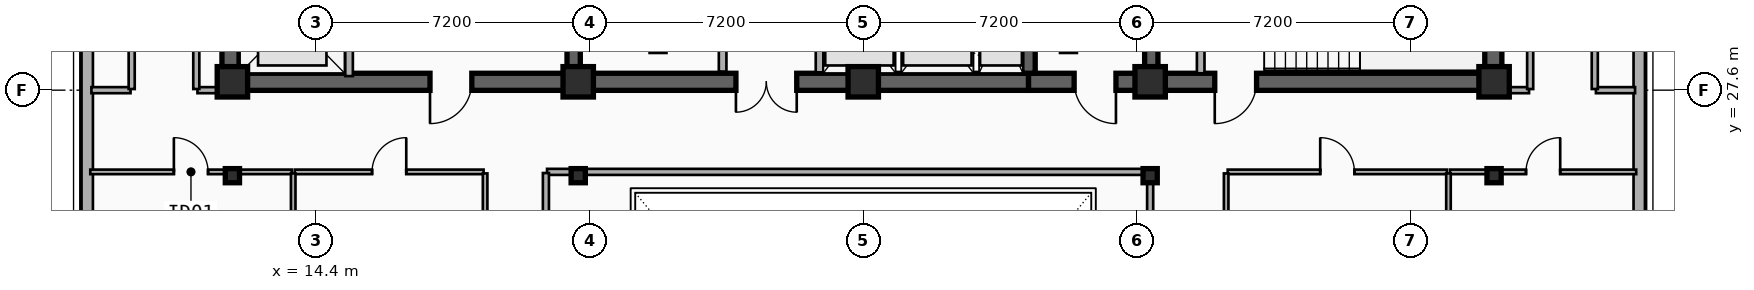
"""IFC4 building model, lengths in metres.
Left out: names, types, materials, properties, quantities, classifications, styles, units other than length and angle.
Written with IfcOpenShell. Run it as: python <this file> out.ifc"""

import sys

from ifc_helpers import new_model, si_unit, direction, frame, frame_2d, origin, origin_2d, place, context, subcontext, project, spatial, rectangle, i_section, extrude, element, fill, save


model = new_model("IFC4")
c1 = context("Model", 3, precision=1e-05, world=origin(), true_north=direction((0.0, 1.0)))
c2 = subcontext(c1, "Body", "Model", "MODEL_VIEW")
j1 = project(units=[si_unit("LENGTHUNIT", "METRE"), si_unit("PLANEANGLEUNIT", "RADIAN")], contexts=[c1])
p1 = place(None, origin())
s1 = spatial("IfcSite", under=j1, at=p1, CompositionType="ELEMENT")
p2 = place(p1, origin())
s2 = spatial("IfcBuilding", under=s1, at=p2, CompositionType="ELEMENT")
p3 = place(p2, frame((0.0, 0.0, 265.8)))
s3 = spatial("IfcBuildingStorey", under=s2, at=p3, CompositionType="ELEMENT", Elevation=265.8)
p4 = place(p3, frame((21.18, 27.82, 0.0), z_axis=(0.0, 0.0, 1.0), x_axis=(-1.0, 0.0, 0.0)))
e1 = element("IfcWall", 1, at=p4, inside=s3, PredefinedType="SHEAR", context=c2, shape_type="SweptSolid", body=[
    extrude(rectangle(XDim=9.03, YDim=0.45, at=frame_2d((4.515, 0.0))), origin(), (0.0, 0.0, 1.0), 3.7),
])
p5 = place(p4, frame((2.68, 0.0, 0.0)))
e2 = element("IfcOpeningElement", 2, at=p5, cuts=e1, PredefinedType="OPENING", context=c2, shape_type="SweptSolid", body=[
    extrude(rectangle(XDim=1.1, YDim=2.15, at=frame_2d((0.55, 1.075))), frame((0.0, 0.235, 0.0), z_axis=(0.0, -1.0, 0.0), x_axis=(1.0, 0.0, 0.0)), (0.0, 0.0, 1.0), 0.47),
])
p6 = place(p3, frame((33.15, 27.82, 0.0), z_axis=(0.0, 0.0, 1.0), x_axis=(-1.0, 0.0, 0.0)))
e3 = element("IfcWall", 3, at=p6, inside=s3, PredefinedType="SHEAR", context=c2, shape_type="SweptSolid", body=[
    extrude(rectangle(XDim=11.97, YDim=0.45, at=frame_2d((5.985, 0.0))), origin(), (0.0, 0.0, 1.0), 3.7),
])
p7 = place(p6, frame((6.1, 0.0, 0.0)))
e4 = element("IfcOpeningElement", 4, at=p7, cuts=e3, PredefinedType="OPENING", context=c2, shape_type="SweptSolid", body=[
    extrude(rectangle(XDim=1.6, YDim=2.2, at=frame_2d((0.8, 1.1))), frame((0.0, 0.235, 0.0), z_axis=(0.0, -1.0, 0.0), x_axis=(1.0, 0.0, 0.0)), (0.0, 0.0, 1.0), 0.47),
])
p8 = place(p3, frame((45.38, 27.82, 0.0), z_axis=(0.0, 0.0, 1.0), x_axis=(-1.0, 0.0, 0.0)))
e5 = element("IfcWall", 5, at=p8, inside=s3, PredefinedType="SHEAR", context=c2, shape_type="SweptSolid", body=[
    extrude(rectangle(XDim=12.23, YDim=0.45, at=frame_2d((6.115, 0.0))), origin(), (0.0, 0.0, 1.0), 3.7),
])
p9 = place(p8, frame((9.93, 0.0, 0.0)))
e6 = element("IfcOpeningElement", 6, at=p9, cuts=e5, PredefinedType="OPENING", context=c2, shape_type="SweptSolid", body=[
    extrude(rectangle(XDim=1.1, YDim=2.15, at=frame_2d((0.55, 1.075))), frame((0.0, 0.235, 0.0), z_axis=(0.0, -1.0, 0.0), x_axis=(1.0, 0.0, 0.0)), (0.0, 0.0, 1.0), 0.47),
])
p10 = place(p8, frame((6.23, 0.0, 0.0)))
e7 = element("IfcOpeningElement", 7, at=p10, cuts=e5, PredefinedType="OPENING", context=c2, shape_type="SweptSolid", body=[
    extrude(rectangle(XDim=1.1, YDim=2.15, at=frame_2d((0.55, 1.075))), frame((0.0, 0.235, 0.0), z_axis=(0.0, -1.0, 0.0), x_axis=(1.0, 0.0, 0.0)), (0.0, 0.0, 1.0), 0.47),
])
for number, where, z_axis, x_axis in (
    (8, (12.15, 28.045, 0.0), (0.0, 0.0, 1.0), (0.0, 1.0, 0.0)),
    (9, (45.38, 28.045, 0.0), (0.0, 0.0, 1.0), (0.0, 1.0, 0.0)),
):
    element("IfcWall", number, at=place(p3, frame(where, z_axis=z_axis, x_axis=x_axis)), inside=s3, PredefinedType="SHEAR", context=c2, shape_type="SweptSolid", body=[
        extrude(rectangle(XDim=8.78, YDim=0.45, at=frame_2d((4.39, 0.0))), origin(), (0.0, 0.0, 1.0), 3.7),
    ])
for number, where, z_axis, x_axis in (
    (10, (21.18, 28.045, 0.0), (0.0, 0.0, 1.0), (0.0, 1.0, 0.0)),
    (11, (33.15, 28.045, 0.0), (0.0, 0.0, 1.0), (0.0, 1.0, 0.0)),
):
    element("IfcWall", number, at=place(p3, frame(where, z_axis=z_axis, x_axis=x_axis)), inside=s3, PredefinedType="SHEAR", context=c2, shape_type="SweptSolid", body=[
        extrude(rectangle(XDim=8.78, YDim=0.35, at=frame_2d((4.39, 0.0))), origin(), (0.0, 0.0, 1.0), 3.7),
    ])
p11 = place(p3, frame((36.38, 28.045, 0.0), z_axis=(0.0, 0.0, 1.0), x_axis=(0.0, 1.0, 0.0)))
e12 = element("IfcWall", 12, at=p11, inside=s3, PredefinedType="SHEAR", context=c2, shape_type="SweptSolid", body=[
    extrude(rectangle(XDim=8.78, YDim=0.35, at=frame_2d((4.39, 0.0))), origin(), (0.0, 0.0, 1.0), 3.7),
])
p12 = place(p11, frame((3.735, 0.0, 0.0)))
e13 = element("IfcOpeningElement", 13, at=p12, cuts=e12, PredefinedType="OPENING", context=c2, shape_type="SweptSolid", body=[
    extrude(rectangle(XDim=1.1, YDim=2.15, at=frame_2d((0.55, 1.075))), frame((0.0, 0.185, 0.0), z_axis=(0.0, -1.0, 0.0), x_axis=(1.0, 0.0, 0.0)), (0.0, 0.0, 1.0), 0.37),
])
for number, where, z_axis, x_axis in (
    (14, (12.2, 27.82, 0.0), (0.0, 0.0, 1.0), (1.0, 0.0, 0.0)),
    (15, (21.3, 27.82, 0.0), (0.0, 0.0, 1.0), (1.0, 0.0, 0.0)),
    (16, (28.8, 27.82, 0.0), (0.0, 0.0, 1.0), (1.0, 0.0, 0.0)),
    (17, (36.35, 27.82, 0.0), (0.0, 0.0, 1.0), (1.0, 0.0, 0.0)),
    (18, (45.4, 27.82, 0.0), (0.0, 0.0, 1.0), (1.0, 0.0, 0.0)),
):
    element("IfcColumn", number, at=place(p3, frame(where, z_axis=z_axis, x_axis=x_axis)), inside=s3, PredefinedType="COLUMN", context=c2, shape_type="SweptSolid", body=[
        extrude(rectangle(XDim=0.8, YDim=0.8, at=origin_2d()), origin(), (0.0, 0.0, 1.0), 3.7),
    ])
for number, where, z_axis, x_axis in (
    (19, (12.2, 25.35, 0.0), (0.0, 0.0, 1.0), (1.0, 0.0, 0.0)),
    (20, (21.3, 25.35, 0.0), (0.0, 0.0, 1.0), (1.0, 0.0, 0.0)),
    (21, (36.35, 25.35, 0.0), (0.0, 0.0, 1.0), (1.0, 0.0, 0.0)),
    (22, (45.4, 25.35, 0.0), (0.0, 0.0, 1.0), (1.0, 0.0, 0.0)),
):
    element("IfcColumn", number, at=place(p3, frame(where, z_axis=z_axis, x_axis=x_axis)), inside=s3, PredefinedType="COLUMN", context=c2, shape_type="SweptSolid", body=[
        extrude(i_section(OverallWidth=0.374, OverallDepth=0.372, WebThickness=0.017, FlangeThickness=0.027, FilletRadius=0.015, at=origin_2d()), origin(), (0.0, 0.0, 1.0), 3.7),
    ])
p13 = place(p3, frame((49.22, 36.8, 0.0), z_axis=(0.0, 0.0, 1.0), x_axis=(0.0, -1.0, 0.0)))
e23 = element("IfcWall", 23, at=p13, inside=s3, PredefinedType="SOLIDWALL", context=c2, shape_type="SweptSolid", body=[
    extrude(rectangle(XDim=34.2, YDim=0.3, at=frame_2d((17.1, 0.0))), origin(), (0.0, 0.0, 1.0), 3.42),
])
p14 = place(p13, frame((17.66, 0.0, 0.75)))
e24 = element("IfcOpeningElement", 24, at=p14, cuts=e23, PredefinedType="OPENING", context=c2, shape_type="SweptSolid", body=[
    extrude(rectangle(XDim=2.1, YDim=2.1, at=frame_2d((1.05, 1.05))), frame((0.0, 0.16, 0.0), z_axis=(0.0, -1.0, 0.0), x_axis=(1.0, 0.0, 0.0)), (0.0, 0.0, 1.0), 0.32),
])
p15 = place(p13, frame((25.77, 0.0, 0.75)))
e25 = element("IfcOpeningElement", 25, at=p15, cuts=e23, PredefinedType="OPENING", context=c2, shape_type="SweptSolid", body=[
    extrude(rectangle(XDim=2.1, YDim=2.1, at=frame_2d((1.05, 1.05))), frame((0.0, 0.16, 0.0), z_axis=(0.0, -1.0, 0.0), x_axis=(1.0, 0.0, 0.0)), (0.0, 0.0, 1.0), 0.32),
])
p16 = place(p3, frame((8.38, 2.6, 0.0), z_axis=(0.0, 0.0, 1.0), x_axis=(0.0, 1.0, 0.0)))
e26 = element("IfcWall", 26, at=p16, inside=s3, PredefinedType="SOLIDWALL", context=c2, shape_type="SweptSolid", body=[
    extrude(rectangle(XDim=34.2, YDim=0.3, at=frame_2d((17.1, 0.0))), origin(), (0.0, 0.0, 1.0), 3.42),
])
p17 = place(p16, frame((6.33, 0.0, 0.75)))
e27 = element("IfcOpeningElement", 27, at=p17, cuts=e26, PredefinedType="OPENING", context=c2, shape_type="SweptSolid", body=[
    extrude(rectangle(XDim=2.1, YDim=2.1, at=frame_2d((1.05, 1.05))), frame((0.0, 0.16, 0.0), z_axis=(0.0, -1.0, 0.0), x_axis=(1.0, 0.0, 0.0)), (0.0, 0.0, 1.0), 0.32),
])
p18 = place(p16, frame((14.44, 0.0, 0.75)))
e28 = element("IfcOpeningElement", 28, at=p18, cuts=e26, PredefinedType="OPENING", context=c2, shape_type="SweptSolid", body=[
    extrude(rectangle(XDim=2.1, YDim=2.1, at=frame_2d((1.05, 1.05))), frame((0.0, 0.16, 0.0), z_axis=(0.0, -1.0, 0.0), x_axis=(1.0, 0.0, 0.0)), (0.0, 0.0, 1.0), 0.32),
])
p19 = place(p3, frame((15.27, 27.97, 0.0), z_axis=(0.0, 0.0, 1.0), x_axis=(0.0, 1.0, 0.0)))
e29 = element("IfcWall", 29, at=p19, inside=s3, PredefinedType="PARTITIONING", context=c2, shape_type="SweptSolid", body=[
    extrude(rectangle(XDim=2.96, YDim=0.2, at=frame_2d((1.48, 0.0))), origin(), (0.0, 0.0, 1.0), 2.49),
])
p20 = place(p19, frame((0.93, 0.0, 0.0)))
e30 = element("IfcOpeningElement", 30, at=p20, cuts=e29, PredefinedType="OPENING", context=c2, shape_type="SweptSolid", body=[
    extrude(rectangle(XDim=1.1, YDim=2.15, at=frame_2d((0.55, 1.075))), frame((0.0, 0.11, 0.0), z_axis=(0.0, -1.0, 0.0), x_axis=(1.0, 0.0, 0.0)), (0.0, 0.0, 1.0), 0.22),
])
p21 = place(p3, frame((27.65, 28.07, 0.0), z_axis=(0.0, 0.0, 1.0), x_axis=(0.0, 1.0, 0.0)))
e31 = element("IfcWall", 31, at=p21, inside=s3, PredefinedType="PARTITIONING", context=c2, shape_type="SweptSolid", body=[
    extrude(rectangle(XDim=2.58, YDim=0.2, at=frame_2d((1.29, 0.0))), origin(), (0.0, 0.0, 1.0), 2.49),
])
p22 = place(p3, frame((37.68, 28.045, 0.0), z_axis=(0.0, 0.0, 1.0), x_axis=(0.0, 1.0, 0.0)))
e32 = element("IfcWall", 32, at=p22, inside=s3, PredefinedType="PARTITIONING", context=c2, shape_type="SweptSolid", body=[
    extrude(rectangle(XDim=3.205, YDim=0.2, at=frame_2d((1.603, 0.0))), origin(), (0.0, 0.0, 1.0), 2.8),
])
p23 = place(p3, frame((25.1, 28.09, 0.0), z_axis=(0.0, 0.0, 1.0), x_axis=(0.0, 1.0, 0.0)))
e33 = element("IfcWall", 33, at=p23, inside=s3, PredefinedType="PARTITIONING", context=c2, shape_type="SweptSolid", body=[
    extrude(rectangle(XDim=1.82, YDim=0.2, at=frame_2d((0.91, 0.0))), origin(), (0.0, 0.0, 1.0), 2.8),
])
p24 = place(p23, frame((0.68, 0.0, 0.0)))
e34 = element("IfcOpeningElement", 34, at=p24, cuts=e33, PredefinedType="OPENING", context=c2, shape_type="SweptSolid", body=[
    extrude(rectangle(XDim=1.0, YDim=2.15, at=frame_2d((0.5, 1.075))), frame((0.0, 0.11, 0.0), z_axis=(0.0, -1.0, 0.0), x_axis=(1.0, 0.0, 0.0)), (0.0, 0.0, 1.0), 0.22),
])
p25 = place(p3, frame((8.46, 25.45, 0.0), z_axis=(0.0, 0.0, 1.0), x_axis=(1.0, 0.0, 0.0)))
e35 = element("IfcWall", 35, at=p25, inside=s3, PredefinedType="PARTITIONING", context=c2, shape_type="SweptSolid", body=[
    extrude(rectangle(XDim=5.3, YDim=0.12, at=frame_2d((2.65, 0.0))), origin(), (0.0, 0.0, 1.0), 2.7),
])
p26 = place(p25, frame((2.2, 0.0, 0.0)))
e36 = element("IfcOpeningElement", 36, at=p26, cuts=e35, PredefinedType="OPENING", context=c2, shape_type="SweptSolid", body=[
    extrude(rectangle(XDim=0.9, YDim=2.1, at=frame_2d((0.45, 1.05))), frame((0.0, 0.07, 0.0), z_axis=(0.0, -1.0, 0.0), x_axis=(1.0, 0.0, 0.0)), (0.0, 0.0, 1.0), 0.14),
])
p27 = place(p3, frame((13.84, 25.45, 0.0), z_axis=(0.0, 0.0, 1.0), x_axis=(1.0, 0.0, 0.0)))
e37 = element("IfcWall", 37, at=p27, inside=s3, PredefinedType="PARTITIONING", context=c2, shape_type="SweptSolid", body=[
    extrude(rectangle(XDim=4.97, YDim=0.12, at=frame_2d((2.485, 0.0))), origin(), (0.0, 0.0, 1.0), 3.42),
])
p28 = place(p27, frame((2.035, 0.0, 0.0)))
e38 = element("IfcOpeningElement", 38, at=p28, cuts=e37, PredefinedType="OPENING", context=c2, shape_type="SweptSolid", body=[
    extrude(rectangle(XDim=0.9, YDim=2.1, at=frame_2d((0.45, 1.05))), frame((0.0, 0.07, 0.0), z_axis=(0.0, -1.0, 0.0), x_axis=(1.0, 0.0, 0.0)), (0.0, 0.0, 1.0), 0.14),
])
p29 = place(p3, frame((38.39, 25.45, 0.0), z_axis=(0.0, 0.0, 1.0), x_axis=(1.0, 0.0, 0.0)))
e39 = element("IfcWall", 39, at=p29, inside=s3, PredefinedType="PARTITIONING", context=c2, shape_type="SweptSolid", body=[
    extrude(rectangle(XDim=5.77, YDim=0.12, at=frame_2d((2.885, 0.0))), origin(), (0.0, 0.0, 1.0), 3.42),
])
p30 = place(p29, frame((2.435, 0.0, 0.0)))
e40 = element("IfcOpeningElement", 40, at=p30, cuts=e39, PredefinedType="OPENING", context=c2, shape_type="SweptSolid", body=[
    extrude(rectangle(XDim=0.9, YDim=2.1, at=frame_2d((0.45, 1.05))), frame((0.0, 0.07, 0.0), z_axis=(0.0, -1.0, 0.0), x_axis=(1.0, 0.0, 0.0)), (0.0, 0.0, 1.0), 0.14),
])
p31 = place(p3, frame((44.24, 25.45, 0.0), z_axis=(0.0, 0.0, 1.0), x_axis=(1.0, 0.0, 0.0)))
e41 = element("IfcWall", 41, at=p31, inside=s3, PredefinedType="PARTITIONING", context=c2, shape_type="SweptSolid", body=[
    extrude(rectangle(XDim=4.9, YDim=0.12, at=frame_2d((2.45, 0.0))), origin(), (0.0, 0.0, 1.0), 2.7),
])
p32 = place(p31, frame((2.0, 0.0, 0.0)))
e42 = element("IfcOpeningElement", 42, at=p32, cuts=e41, PredefinedType="OPENING", context=c2, shape_type="SweptSolid", body=[
    extrude(rectangle(XDim=0.9, YDim=2.1, at=frame_2d((0.45, 1.05))), frame((0.0, 0.07, 0.0), z_axis=(0.0, -1.0, 0.0), x_axis=(1.0, 0.0, 0.0)), (0.0, 0.0, 1.0), 0.14),
])
p33 = place(p3, frame((18.85, 8.89, 0.0), z_axis=(0.0, 0.0, 1.0), x_axis=(0.0, 1.0, 0.0)))
e43 = element("IfcWall", 43, at=p33, inside=s3, PredefinedType="PARTITIONING", context=c2, shape_type="SweptSolid", body=[
    extrude(rectangle(XDim=16.52, YDim=0.12, at=frame_2d((8.26, 0.0))), origin(), (0.0, 0.0, 1.0), 2.91),
])
p34 = place(p33, frame((7.81, 0.0, 0.0)))
e44 = element("IfcOpeningElement", 44, at=p34, cuts=e43, PredefinedType="OPENING", context=c2, shape_type="SweptSolid", body=[
    extrude(rectangle(XDim=0.9, YDim=2.1, at=frame_2d((0.45, 1.05))), frame((0.0, 0.07, 0.0), z_axis=(0.0, -1.0, 0.0), x_axis=(1.0, 0.0, 0.0)), (0.0, 0.0, 1.0), 0.14),
])
p35 = place(p3, frame((38.35, 8.89, 0.0), z_axis=(0.0, 0.0, 1.0), x_axis=(0.0, 1.0, 0.0)))
e45 = element("IfcWall", 45, at=p35, inside=s3, PredefinedType="PARTITIONING", context=c2, shape_type="SweptSolid", body=[
    extrude(rectangle(XDim=16.52, YDim=0.12, at=frame_2d((8.26, 0.0))), origin(), (0.0, 0.0, 1.0), 2.91),
])
p36 = place(p35, frame((7.81, 0.0, 0.0)))
e46 = element("IfcOpeningElement", 46, at=p36, cuts=e45, PredefinedType="OPENING", context=c2, shape_type="SweptSolid", body=[
    extrude(rectangle(XDim=0.9, YDim=2.1, at=frame_2d((0.45, 1.05))), frame((0.0, 0.07, 0.0), z_axis=(0.0, -1.0, 0.0), x_axis=(1.0, 0.0, 0.0)), (0.0, 0.0, 1.0), 0.14),
])
for number, where, z_axis, x_axis in (
    (47, (13.8, -1.34, 0.0), (0.0, 0.0, 1.0), (0.0, 1.0, 0.0)),
    (48, (44.2, -1.34, 0.0), (0.0, 0.0, 1.0), (0.0, 1.0, 0.0)),
):
    element("IfcWall", number, at=place(p3, frame(where, z_axis=z_axis, x_axis=x_axis)), inside=s3, PredefinedType="PARTITIONING", context=c2, shape_type="SweptSolid", body=[
        extrude(rectangle(XDim=26.75, YDim=0.12, at=frame_2d((13.375, 0.0))), origin(), (0.0, 0.0, 1.0), 2.91),
    ])
p37 = place(p3, frame((20.48, 25.45, 0.0), z_axis=(0.0, 0.0, 1.0), x_axis=(1.0, 0.0, 0.0)))
e49 = element("IfcWall", 49, at=p37, inside=s3, PredefinedType="PARTITIONING", context=c2, shape_type="SweptSolid", body=[
    extrude(rectangle(XDim=15.84, YDim=0.16, at=frame_2d((7.92, 0.0))), origin(), (0.0, 0.0, 1.0), 2.7),
])
p38 = place(p3, frame((8.49, 27.6, 0.0), z_axis=(0.0, 0.0, 1.0), x_axis=(1.0, 0.0, 0.0)))
e50 = element("IfcWall", 50, at=p38, inside=s3, PredefinedType="PARTITIONING", context=c2, shape_type="SweptSolid", body=[
    extrude(rectangle(XDim=1.03, YDim=0.16, at=frame_2d((0.515, 0.0))), origin(), (0.0, 0.0, 1.0), 3.42),
])
p39 = place(p3, frame((11.28, 27.6, 0.0), z_axis=(0.0, 0.0, 1.0), x_axis=(1.0, 0.0, 0.0)))
e51 = element("IfcWall", 51, at=p39, inside=s3, PredefinedType="PARTITIONING", context=c2, shape_type="SweptSolid", body=[
    extrude(rectangle(XDim=0.84, YDim=0.16, at=frame_2d((0.42, 0.0))), origin(), (0.0, 0.0, 1.0), 2.49),
])
p40 = place(p3, frame((45.41, 27.6, 0.0), z_axis=(0.0, 0.0, 1.0), x_axis=(1.0, 0.0, 0.0)))
e52 = element("IfcWall", 52, at=p40, inside=s3, PredefinedType="PARTITIONING", context=c2, shape_type="SweptSolid", body=[
    extrude(rectangle(XDim=0.91, YDim=0.16, at=frame_2d((0.455, 0.0))), origin(), (0.0, 0.0, 1.0), 2.49),
])
p41 = place(p3, frame((48.08, 27.6, 0.0), z_axis=(0.0, 0.0, 1.0), x_axis=(1.0, 0.0, 0.0)))
e53 = element("IfcWall", 53, at=p41, inside=s3, PredefinedType="PARTITIONING", context=c2, shape_type="SweptSolid", body=[
    extrude(rectangle(XDim=1.03, YDim=0.16, at=frame_2d((0.515, 0.0))), origin(), (0.0, 0.0, 1.0), 3.42),
])
p42 = place(p3, frame((20.45, 10.43, 0.0), z_axis=(0.0, 0.0, 1.0), x_axis=(0.0, 1.0, 0.0)))
e54 = element("IfcWall", 54, at=p42, inside=s3, PredefinedType="PARTITIONING", context=c2, shape_type="SweptSolid", body=[
    extrude(rectangle(XDim=14.99, YDim=0.16, at=frame_2d((7.495, 0.0))), origin(), (0.0, 0.0, 1.0), 2.91),
])
p43 = place(p3, frame((36.35, 10.43, 0.0), z_axis=(0.0, 0.0, 1.0), x_axis=(0.0, 1.0, 0.0)))
e55 = element("IfcWall", 55, at=p43, inside=s3, PredefinedType="PARTITIONING", context=c2, shape_type="SweptSolid", body=[
    extrude(rectangle(XDim=14.99, YDim=0.16, at=frame_2d((7.495, 0.0))), origin(), (0.0, 0.0, 1.0), 2.7),
])
for number, where, z_axis, x_axis in (
    (56, (9.55, 27.63, 0.0), (0.0, 0.0, 1.0), (0.0, 1.0, 0.0)),
    (57, (11.25, 27.63, 0.0), (0.0, 0.0, 1.0), (0.0, 1.0, 0.0)),
    (58, (46.35, 27.63, 0.0), (0.0, 0.0, 1.0), (0.0, 1.0, 0.0)),
    (59, (48.05, 27.63, 0.0), (0.0, 0.0, 1.0), (0.0, 1.0, 0.0)),
):
    element("IfcWall", number, at=place(p3, frame(where, z_axis=z_axis, x_axis=x_axis)), inside=s3, PredefinedType="PARTITIONING", context=c2, shape_type="SweptSolid", body=[
        extrude(rectangle(XDim=10.24, YDim=0.16, at=frame_2d((5.12, 0.0))), origin(), (0.0, 0.0, 1.0), 2.9),
    ])
p44 = place(p5, origin())
e60 = element("IfcDoor", 60, at=p44, inside=s3, OperationType="SINGLE_SWING_RIGHT", PredefinedType="DOOR", context=c2, shape_type="SweptSolid", body=[
    extrude(rectangle(XDim=1.1, YDim=2.15, at=frame_2d((0.55, 1.075))), frame((0.0, 0.025, 0.0), z_axis=(0.0, -1.0, 0.0), x_axis=(1.0, 0.0, 0.0)), (0.0, 0.0, 1.0), 0.05),
])
fill(e2, e60)
p45 = place(p9, origin())
e61 = element("IfcDoor", 61, at=p45, inside=s3, OperationType="SINGLE_SWING_LEFT", PredefinedType="DOOR", context=c2, shape_type="SweptSolid", body=[
    extrude(rectangle(XDim=1.1, YDim=2.15, at=frame_2d((0.55, 1.075))), frame((0.0, 0.025, 0.0), z_axis=(0.0, -1.0, 0.0), x_axis=(1.0, 0.0, 0.0)), (0.0, 0.0, 1.0), 0.05),
])
fill(e6, e61)
p46 = place(p10, origin())
e62 = element("IfcDoor", 62, at=p46, inside=s3, OperationType="SINGLE_SWING_RIGHT", PredefinedType="DOOR", context=c2, shape_type="SweptSolid", body=[
    extrude(rectangle(XDim=1.1, YDim=2.15, at=frame_2d((0.55, 1.075))), frame((0.0, 0.025, 0.0), z_axis=(0.0, -1.0, 0.0), x_axis=(1.0, 0.0, 0.0)), (0.0, 0.0, 1.0), 0.05),
])
fill(e7, e62)
p47 = place(p7, origin())
e63 = element("IfcDoor", 63, at=p47, inside=s3, OperationType="SINGLE_SWING_LEFT", PredefinedType="DOOR", context=c2, shape_type="SweptSolid", body=[
    extrude(rectangle(XDim=1.6, YDim=2.2, at=frame_2d((0.8, 1.1))), frame((0.0, 0.025, 0.0), z_axis=(0.0, -1.0, 0.0), x_axis=(1.0, 0.0, 0.0)), (0.0, 0.0, 1.0), 0.05),
])
fill(e4, e63)
p48 = place(p26, origin())
e64 = element("IfcDoor", 64, at=p48, inside=s3, OperationType="SINGLE_SWING_LEFT", PredefinedType="DOOR", context=c2, shape_type="SweptSolid", body=[
    extrude(rectangle(XDim=0.9, YDim=2.1, at=frame_2d((0.45, 1.05))), frame((0.0, 0.025, 0.0), z_axis=(0.0, -1.0, 0.0), x_axis=(1.0, 0.0, 0.0)), (0.0, 0.0, 1.0), 0.05),
])
fill(e36, e64)
p49 = place(p28, origin())
e65 = element("IfcDoor", 65, at=p49, inside=s3, OperationType="SINGLE_SWING_RIGHT", PredefinedType="DOOR", context=c2, shape_type="SweptSolid", body=[
    extrude(rectangle(XDim=0.9, YDim=2.1, at=frame_2d((0.45, 1.05))), frame((0.0, 0.025, 0.0), z_axis=(0.0, -1.0, 0.0), x_axis=(1.0, 0.0, 0.0)), (0.0, 0.0, 1.0), 0.05),
])
fill(e38, e65)
p50 = place(p30, origin())
e66 = element("IfcDoor", 66, at=p50, inside=s3, OperationType="SINGLE_SWING_LEFT", PredefinedType="DOOR", context=c2, shape_type="SweptSolid", body=[
    extrude(rectangle(XDim=0.9, YDim=2.1, at=frame_2d((0.45, 1.05))), frame((0.0, 0.025, 0.0), z_axis=(0.0, -1.0, 0.0), x_axis=(1.0, 0.0, 0.0)), (0.0, 0.0, 1.0), 0.05),
])
fill(e40, e66)
p51 = place(p32, origin())
e67 = element("IfcDoor", 67, at=p51, inside=s3, OperationType="SINGLE_SWING_RIGHT", PredefinedType="DOOR", context=c2, shape_type="SweptSolid", body=[
    extrude(rectangle(XDim=0.9, YDim=2.1, at=frame_2d((0.45, 1.05))), frame((0.0, 0.025, 0.0), z_axis=(0.0, -1.0, 0.0), x_axis=(1.0, 0.0, 0.0)), (0.0, 0.0, 1.0), 0.05),
])
fill(e42, e67)
save(model, sys.argv[1])
